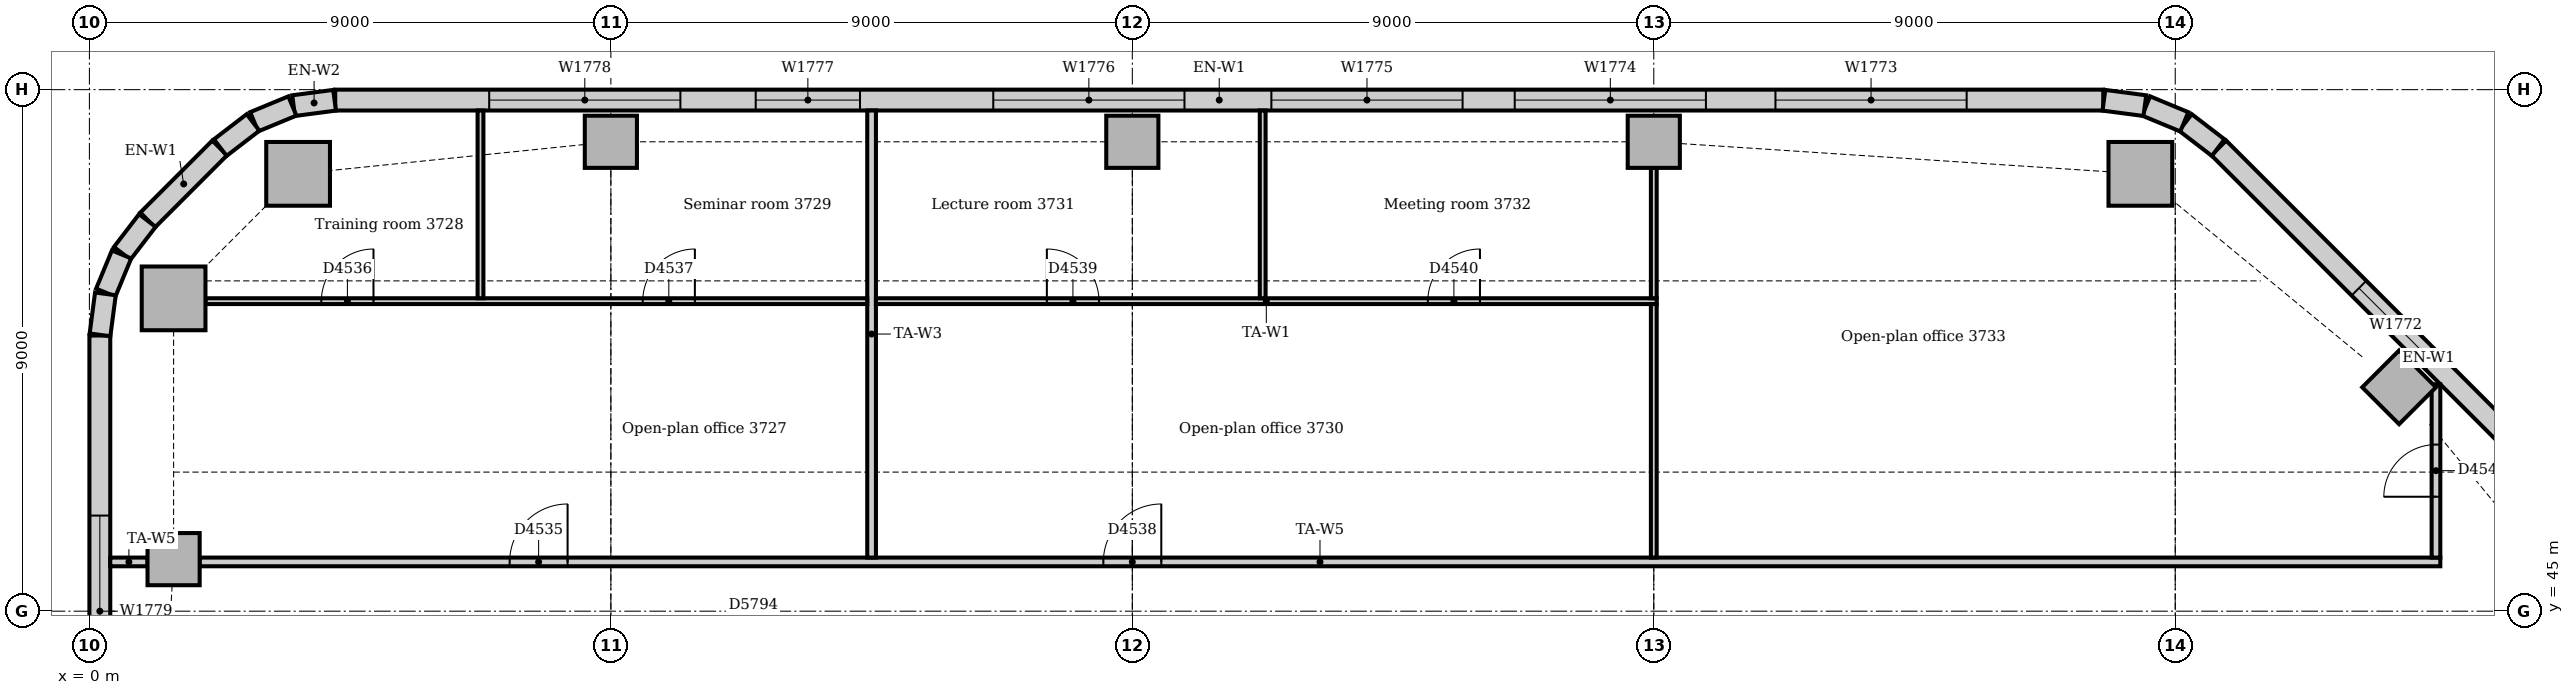
"""IFC4 building model, lengths in metres.
Left out: names, types, materials, properties, quantities, classifications, styles, units other than length and angle.
Written with IfcOpenShell. Run it as: python <this file> out.ifc"""

import sys

from ifc_helpers import new_model, si_unit, direction, frame, frame_2d, origin, origin_2d, place, context, subcontext, project, spatial, rectangle, extrude, element, fill, save


model = new_model("IFC4")
c1 = context("Model", 3, precision=1e-05, world=origin(), true_north=direction((0.0, 1.0)))
c2 = subcontext(c1, "Body", "Model", "MODEL_VIEW")
j1 = project(units=[si_unit("LENGTHUNIT", "METRE"), si_unit("PLANEANGLEUNIT", "RADIAN")], contexts=[c1])
p1 = place(None, origin())
s1 = spatial("IfcSite", under=j1, at=p1, CompositionType="ELEMENT")
p2 = place(p1, origin())
s2 = spatial("IfcBuilding", under=s1, at=p2, CompositionType="ELEMENT")
p3 = place(p2, frame((0.0, 0.0, 157.0)))
s3 = spatial("IfcBuildingStorey", under=s2, at=p3, CompositionType="ELEMENT", Elevation=157.0)
for number, where, z_axis, x_axis in (
    (1, (35.398, 52.547, 0.0), (0.0, 0.0, 1.0), (1.0, 0.0, 0.0)),
    (2, (3.602, 52.547, 0.0), (0.0, 0.0, 1.0), (1.0, 0.0, 0.0)),
    (3, (1.453, 50.398, 0.0), (0.0, 0.0, 1.0), (1.0, 0.0, 0.0)),
):
    element("IfcColumn", number, at=place(p3, frame(where, z_axis=z_axis, x_axis=x_axis)), inside=s3, PredefinedType="COLUMN", context=c2, shape_type="SweptSolid", body=[
        extrude(rectangle(XDim=1.1, YDim=1.1, at=origin_2d()), origin(), (0.0, 0.0, 1.0), 3.85),
    ])
for number, where, z_axis, x_axis in (
    (4, (39.864, 48.864, 0.0), (0.0, 0.0, 1.0), (0.707, 0.707, 0.0)),
    (5, (9.0, 53.1, 0.0), (0.0, 0.0, 1.0), (1.0, 0.0, 0.0)),
    (6, (18.0, 53.1, 0.0), (0.0, 0.0, 1.0), (1.0, 0.0, 0.0)),
    (7, (27.0, 53.1, 0.0), (0.0, 0.0, 1.0), (1.0, 0.0, 0.0)),
    (8, (1.453, 45.898, 0.0), (0.0, 0.0, 1.0), (1.0, 0.0, 0.0)),
):
    element("IfcColumn", number, at=place(p3, frame(where, z_axis=z_axis, x_axis=x_axis)), inside=s3, PredefinedType="COLUMN", context=c2, shape_type="SweptSolid", body=[
        extrude(rectangle(XDim=0.9, YDim=0.9, at=origin_2d()), origin(), (0.0, 0.0, 1.0), 3.85),
    ])
p4 = place(p3, frame((43.994, 45.751, 0.0), z_axis=(0.0, 0.0, 1.0), x_axis=(-0.707106781187, 0.707106781187, 0.0)))
e9 = element("IfcWall", 9, at=p4, inside=s3, PredefinedType="STANDARD", context=c2, shape_type="SweptSolid", body=[
    extrude(rectangle(XDim=10.243, YDim=0.36, at=frame_2d((5.121, 0.0))), origin(), (0.0, 0.0, 1.0), 3.85),
])
p5 = place(p4, frame((5.021, 0.0, 0.9)))
e10 = element("IfcOpeningElement", 10, at=p5, cuts=e9, PredefinedType="OPENING", context=c2, shape_type="SweptSolid", body=[
    extrude(rectangle(XDim=1.8, YDim=1.6, at=frame_2d((0.9, 0.8))), frame((0.0, 0.19, 0.0), z_axis=(0.0, -1.0, 0.0), x_axis=(1.0, 0.0, 0.0)), (0.0, 0.0, 1.0), 0.38),
])
p6 = place(p3, frame((34.757, 53.82, 0.0), z_axis=(0.0, 0.0, 1.0), x_axis=(-1.0, 0.0, 0.0)))
e11 = element("IfcWall", 11, at=p6, inside=s3, PredefinedType="STANDARD", context=c2, shape_type="SweptSolid", body=[
    extrude(rectangle(XDim=30.515, YDim=0.36, at=frame_2d((15.257, 0.0))), origin(), (0.0, 0.0, 1.0), 3.85),
])
p7 = place(p6, frame((2.357, 0.0, 0.9)))
e12 = element("IfcOpeningElement", 12, at=p7, cuts=e11, PredefinedType="OPENING", context=c2, shape_type="SweptSolid", body=[
    extrude(rectangle(XDim=3.3, YDim=1.6, at=frame_2d((1.65, 0.8))), frame((0.0, 0.19, 0.0), z_axis=(0.0, -1.0, 0.0), x_axis=(1.0, 0.0, 0.0)), (0.0, 0.0, 1.0), 0.38),
])
p8 = place(p6, frame((6.857, 0.0, 0.9)))
e13 = element("IfcOpeningElement", 13, at=p8, cuts=e11, PredefinedType="OPENING", context=c2, shape_type="SweptSolid", body=[
    extrude(rectangle(XDim=3.3, YDim=1.6, at=frame_2d((1.65, 0.8))), frame((0.0, 0.19, 0.0), z_axis=(0.0, -1.0, 0.0), x_axis=(1.0, 0.0, 0.0)), (0.0, 0.0, 1.0), 0.38),
])
p9 = place(p6, frame((11.057, 0.0, 0.9)))
e14 = element("IfcOpeningElement", 14, at=p9, cuts=e11, PredefinedType="OPENING", context=c2, shape_type="SweptSolid", body=[
    extrude(rectangle(XDim=3.3, YDim=1.6, at=frame_2d((1.65, 0.8))), frame((0.0, 0.19, 0.0), z_axis=(0.0, -1.0, 0.0), x_axis=(1.0, 0.0, 0.0)), (0.0, 0.0, 1.0), 0.38),
])
p10 = place(p6, frame((15.857, 0.0, 0.9)))
e15 = element("IfcOpeningElement", 15, at=p10, cuts=e11, PredefinedType="OPENING", context=c2, shape_type="SweptSolid", body=[
    extrude(rectangle(XDim=3.3, YDim=1.6, at=frame_2d((1.65, 0.8))), frame((0.0, 0.19, 0.0), z_axis=(0.0, -1.0, 0.0), x_axis=(1.0, 0.0, 0.0)), (0.0, 0.0, 1.0), 0.38),
])
p11 = place(p6, frame((21.457, 0.0, 0.9)))
e16 = element("IfcOpeningElement", 16, at=p11, cuts=e11, PredefinedType="OPENING", context=c2, shape_type="SweptSolid", body=[
    extrude(rectangle(XDim=1.8, YDim=1.6, at=frame_2d((0.9, 0.8))), frame((0.0, 0.19, 0.0), z_axis=(0.0, -1.0, 0.0), x_axis=(1.0, 0.0, 0.0)), (0.0, 0.0, 1.0), 0.38),
])
p12 = place(p6, frame((24.557, 0.0, 0.9)))
e17 = element("IfcOpeningElement", 17, at=p12, cuts=e11, PredefinedType="OPENING", context=c2, shape_type="SweptSolid", body=[
    extrude(rectangle(XDim=3.3, YDim=1.6, at=frame_2d((1.65, 0.8))), frame((0.0, 0.19, 0.0), z_axis=(0.0, -1.0, 0.0), x_axis=(1.0, 0.0, 0.0)), (0.0, 0.0, 1.0), 0.38),
])
p13 = place(p3, frame((2.249, 52.994, 0.0), z_axis=(0.0, 0.0, 1.0), x_axis=(-0.707106781187, -0.707106781187, 0.0)))
e18 = element("IfcWall", 18, at=p13, inside=s3, PredefinedType="STANDARD", context=c2, shape_type="SweptSolid", body=[
    extrude(rectangle(XDim=1.757, YDim=0.36, at=frame_2d((0.879, 0.0))), origin(), (0.0, 0.0, 1.0), 3.85),
])
p14 = place(p3, frame((0.18, 49.757, 0.0), z_axis=(0.0, 0.0, 1.0), x_axis=(0.0, -1.0, 0.0)))
e19 = element("IfcWall", 19, at=p14, inside=s3, PredefinedType="STANDARD", context=c2, shape_type="SweptSolid", body=[
    extrude(rectangle(XDim=7.757, YDim=0.36, at=frame_2d((3.879, 0.0))), origin(), (0.0, 0.0, 1.0), 3.85),
])
p15 = place(p14, frame((3.107, 0.0, 0.9)))
e20 = element("IfcOpeningElement", 20, at=p15, cuts=e19, PredefinedType="OPENING", context=c2, shape_type="SweptSolid", body=[
    extrude(rectangle(XDim=3.3, YDim=1.6, at=frame_2d((1.65, 0.8))), frame((0.0, 0.19, 0.0), z_axis=(0.0, -1.0, 0.0), x_axis=(1.0, 0.0, 0.0)), (0.0, 0.0, 1.0), 0.38),
])
p16 = place(p3, frame((36.741, 53.0, 0.0), z_axis=(0.0, 0.0, 1.0), x_axis=(-0.793321924995, 0.608802368033, 0.0)))
e21 = element("IfcWall", 21, at=p16, inside=s3, PredefinedType="STANDARD", context=c2, shape_type="SweptSolid", body=[
    extrude(rectangle(XDim=0.713, YDim=0.36, at=frame_2d((0.357, 0.0))), origin(), (0.0, 0.0, 1.0), 3.85),
])
for number, where, z_axis, x_axis in (
    (22, (36.156, 53.445, 0.0), (0.0, 0.0, 1.0), (-0.924, 0.383, 0.0)),
    (23, (35.476, 53.724, 0.0), (0.0, 0.0, 1.0), (-0.991, 0.131, 0.0)),
    (24, (4.231, 53.817, 0.0), (0.0, 0.0, 1.0), (-0.991, -0.131, 0.0)),
    (25, (3.503, 53.718, 0.0), (0.0, 0.0, 1.0), (-0.924, -0.383, 0.0)),
):
    element("IfcWall", number, at=place(p3, frame(where, z_axis=z_axis, x_axis=x_axis)), inside=s3, PredefinedType="STANDARD", context=c2, shape_type="SweptSolid", body=[
        extrude(rectangle(XDim=0.713, YDim=0.36, at=frame_2d((0.356, 0.0))), origin(), (0.0, 0.0, 1.0), 3.85),
    ])
for number, where, z_axis, x_axis in (
    (26, (2.825, 53.434, 0.0), (0.0, 0.0, 1.0), (-0.793, -0.609, 0.0)),
    (27, (1.0, 51.741, 0.0), (0.0, 0.0, 1.0), (-0.609, -0.793, 0.0)),
):
    element("IfcWall", number, at=place(p3, frame(where, z_axis=z_axis, x_axis=x_axis)), inside=s3, PredefinedType="STANDARD", context=c2, shape_type="SweptSolid", body=[
        extrude(rectangle(XDim=0.713, YDim=0.36, at=frame_2d((0.357, 0.0))), origin(), (0.0, 0.0, 1.0), 3.85),
    ])
for number, where, z_axis, x_axis in (
    (28, (0.555, 51.156, 0.0), (0.0, 0.0, 1.0), (-0.383, -0.924, 0.0)),
    (29, (0.276, 50.476, 0.0), (0.0, 0.0, 1.0), (-0.131, -0.991, 0.0)),
):
    element("IfcWall", number, at=place(p3, frame(where, z_axis=z_axis, x_axis=x_axis)), inside=s3, PredefinedType="STANDARD", context=c2, shape_type="SweptSolid", body=[
        extrude(rectangle(XDim=0.713, YDim=0.36, at=frame_2d((0.356, 0.0))), origin(), (0.0, 0.0, 1.0), 3.85),
    ])
p17 = place(p3, frame((1.903, 45.85, 0.0), z_axis=(0.0, 0.0, 1.0), x_axis=(1.0, 0.0, 0.0)))
e30 = element("IfcWall", 30, at=p17, inside=s3, PredefinedType="PARTITIONING", context=c2, shape_type="SweptSolid", body=[
    extrude(rectangle(XDim=38.672, YDim=0.15, at=frame_2d((19.336, 0.0))), origin(), (0.0, 0.0, 1.0), 3.85),
])
p18 = place(p17, frame((5.35, 0.0, 0.0)))
e31 = element("IfcOpeningElement", 31, at=p18, cuts=e30, PredefinedType="OPENING", context=c2, shape_type="SweptSolid", body=[
    extrude(rectangle(XDim=1.0, YDim=2.1, at=frame_2d((0.5, 1.05))), frame((0.0, 0.085, 0.0), z_axis=(0.0, -1.0, 0.0), x_axis=(1.0, 0.0, 0.0)), (0.0, 0.0, 1.0), 0.17),
])
p19 = place(p17, frame((15.597, 0.0, 0.0)))
e32 = element("IfcOpeningElement", 32, at=p19, cuts=e30, PredefinedType="OPENING", context=c2, shape_type="SweptSolid", body=[
    extrude(rectangle(XDim=1.0, YDim=2.1, at=frame_2d((0.5, 1.05))), frame((0.0, 0.085, 0.0), z_axis=(0.0, -1.0, 0.0), x_axis=(1.0, 0.0, 0.0)), (0.0, 0.0, 1.0), 0.17),
])
p20 = place(p3, frame((0.36, 45.85, 0.0), z_axis=(0.0, 0.0, 1.0), x_axis=(1.0, 0.0, 0.0)))
e33 = element("IfcWall", 33, at=p20, inside=s3, PredefinedType="PARTITIONING", context=c2, shape_type="SweptSolid", body=[
    extrude(rectangle(XDim=0.643, YDim=0.15, at=frame_2d((0.322, 0.0))), origin(), (0.0, 0.0, 1.0), 3.85),
])
p21 = place(p3, frame((40.5, 45.925, 0.0), z_axis=(0.0, 0.0, 1.0), x_axis=(0.0, 1.0, 0.0)))
e34 = element("IfcWall", 34, at=p21, inside=s3, PredefinedType="PARTITIONING", context=c2, shape_type="SweptSolid", body=[
    extrude(rectangle(XDim=2.991, YDim=0.15, at=frame_2d((1.496, 0.0))), origin(), (0.0, 0.0, 1.0), 3.85),
])
p22 = place(p21, frame((1.05, 0.0, 0.0)))
e35 = element("IfcOpeningElement", 35, at=p22, cuts=e34, PredefinedType="OPENING", context=c2, shape_type="SweptSolid", body=[
    extrude(rectangle(XDim=0.9, YDim=2.1, at=frame_2d((0.45, 1.05))), frame((0.0, 0.085, 0.0), z_axis=(0.0, -1.0, 0.0), x_axis=(1.0, 0.0, 0.0)), (0.0, 0.0, 1.0), 0.17),
])
p23 = place(p3, frame((13.5, 45.925, 0.0), z_axis=(0.0, 0.0, 1.0), x_axis=(0.0, 1.0, 0.0)))
e36 = element("IfcWall", 36, at=p23, inside=s3, PredefinedType="PARTITIONING", context=c2, shape_type="SweptSolid", body=[
    extrude(rectangle(XDim=7.715, YDim=0.15, at=frame_2d((3.857, 0.0))), origin(), (0.0, 0.0, 1.0), 3.85),
])
p24 = place(p3, frame((13.575, 50.35, 0.0), z_axis=(0.0, 0.0, 1.0), x_axis=(1.0, 0.0, 0.0)))
e37 = element("IfcWall", 37, at=p24, inside=s3, PredefinedType="PARTITIONING", context=c2, shape_type="SweptSolid", body=[
    extrude(rectangle(XDim=13.475, YDim=0.1, at=frame_2d((6.737, 0.0))), origin(), (0.0, 0.0, 1.0), 3.85),
])
p25 = place(p24, frame((2.95, 0.0, 0.0)))
e38 = element("IfcOpeningElement", 38, at=p25, cuts=e37, PredefinedType="OPENING", context=c2, shape_type="SweptSolid", body=[
    extrude(rectangle(XDim=0.9, YDim=2.1, at=frame_2d((0.45, 1.05))), frame((0.0, 0.06, 0.0), z_axis=(0.0, -1.0, 0.0), x_axis=(1.0, 0.0, 0.0)), (0.0, 0.0, 1.0), 0.12),
])
p26 = place(p24, frame((9.525, 0.0, 0.0)))
e39 = element("IfcOpeningElement", 39, at=p26, cuts=e37, PredefinedType="OPENING", context=c2, shape_type="SweptSolid", body=[
    extrude(rectangle(XDim=0.9, YDim=2.1, at=frame_2d((0.45, 1.05))), frame((0.0, 0.06, 0.0), z_axis=(0.0, -1.0, 0.0), x_axis=(1.0, 0.0, 0.0)), (0.0, 0.0, 1.0), 0.12),
])
p27 = place(p3, frame((2.003, 50.35, 0.0), z_axis=(0.0, 0.0, 1.0), x_axis=(1.0, 0.0, 0.0)))
e40 = element("IfcWall", 40, at=p27, inside=s3, PredefinedType="PARTITIONING", context=c2, shape_type="SweptSolid", body=[
    extrude(rectangle(XDim=11.422, YDim=0.1, at=frame_2d((5.711, 0.0))), origin(), (0.0, 0.0, 1.0), 3.85),
])
p28 = place(p27, frame((2.0, 0.0, 0.0)))
e41 = element("IfcOpeningElement", 41, at=p28, cuts=e40, PredefinedType="OPENING", context=c2, shape_type="SweptSolid", body=[
    extrude(rectangle(XDim=0.9, YDim=2.1, at=frame_2d((0.45, 1.05))), frame((0.0, 0.06, 0.0), z_axis=(0.0, -1.0, 0.0), x_axis=(1.0, 0.0, 0.0)), (0.0, 0.0, 1.0), 0.12),
])
p29 = place(p27, frame((7.547, 0.0, 0.0)))
e42 = element("IfcOpeningElement", 42, at=p29, cuts=e40, PredefinedType="OPENING", context=c2, shape_type="SweptSolid", body=[
    extrude(rectangle(XDim=0.9, YDim=2.1, at=frame_2d((0.45, 1.05))), frame((0.0, 0.06, 0.0), z_axis=(0.0, -1.0, 0.0), x_axis=(1.0, 0.0, 0.0)), (0.0, 0.0, 1.0), 0.12),
])
p30 = place(p3, frame((27.0, 45.925, 0.0), z_axis=(0.0, 0.0, 1.0), x_axis=(0.0, 1.0, 0.0)))
e43 = element("IfcWall", 43, at=p30, inside=s3, PredefinedType="PARTITIONING", context=c2, shape_type="SweptSolid", body=[
    extrude(rectangle(XDim=4.375, YDim=0.1, at=frame_2d((2.188, 0.0))), origin(), (0.0, 0.0, 1.0), 3.362),
])
p31 = place(p3, frame((27.0, 50.4, 0.0), z_axis=(0.0, 0.0, 1.0), x_axis=(0.0, 1.0, 0.0)))
e44 = element("IfcWall", 44, at=p31, inside=s3, PredefinedType="PARTITIONING", context=c2, shape_type="SweptSolid", body=[
    extrude(rectangle(XDim=2.25, YDim=0.1, at=frame_2d((1.125, 0.0))), origin(), (0.0, 0.0, 1.0), 3.362),
])
for number, where, z_axis, x_axis in (
    (45, (6.75, 50.4, 0.0), (0.0, 0.0, 1.0), (0.0, 1.0, 0.0)),
    (46, (20.25, 50.4, 0.0), (0.0, 0.0, 1.0), (0.0, 1.0, 0.0)),
):
    element("IfcWall", number, at=place(p3, frame(where, z_axis=z_axis, x_axis=x_axis)), inside=s3, PredefinedType="PARTITIONING", context=c2, shape_type="SweptSolid", body=[
        extrude(rectangle(XDim=3.24, YDim=0.1, at=frame_2d((1.62, 0.0))), origin(), (0.0, 0.0, 1.0), 3.85),
    ])
p32 = place(p5, origin())
e47 = element("IfcWindow", 47, at=p32, inside=s3, PartitioningType="SINGLE_PANEL", PredefinedType="WINDOW", context=c2, shape_type="SweptSolid", body=[
    extrude(rectangle(XDim=1.8, YDim=1.6, at=frame_2d((0.9, 0.8))), frame((0.0, 0.13, 0.0), z_axis=(0.0, -1.0, 0.0), x_axis=(1.0, 0.0, 0.0)), (0.0, 0.0, 1.0), 0.06),
])
fill(e10, e47)
p33 = place(p7, origin())
e48 = element("IfcWindow", 48, at=p33, inside=s3, PartitioningType="SINGLE_PANEL", PredefinedType="WINDOW", context=c2, shape_type="SweptSolid", body=[
    extrude(rectangle(XDim=3.3, YDim=1.6, at=frame_2d((1.65, 0.8))), frame((0.0, 0.13, 0.0), z_axis=(0.0, -1.0, 0.0), x_axis=(1.0, 0.0, 0.0)), (0.0, 0.0, 1.0), 0.06),
])
fill(e12, e48)
p34 = place(p8, origin())
e49 = element("IfcWindow", 49, at=p34, inside=s3, PartitioningType="SINGLE_PANEL", PredefinedType="WINDOW", context=c2, shape_type="SweptSolid", body=[
    extrude(rectangle(XDim=3.3, YDim=1.6, at=frame_2d((1.65, 0.8))), frame((0.0, 0.13, 0.0), z_axis=(0.0, -1.0, 0.0), x_axis=(1.0, 0.0, 0.0)), (0.0, 0.0, 1.0), 0.06),
])
fill(e13, e49)
p35 = place(p9, origin())
e50 = element("IfcWindow", 50, at=p35, inside=s3, PartitioningType="SINGLE_PANEL", PredefinedType="WINDOW", context=c2, shape_type="SweptSolid", body=[
    extrude(rectangle(XDim=3.3, YDim=1.6, at=frame_2d((1.65, 0.8))), frame((0.0, 0.13, 0.0), z_axis=(0.0, -1.0, 0.0), x_axis=(1.0, 0.0, 0.0)), (0.0, 0.0, 1.0), 0.06),
])
fill(e14, e50)
p36 = place(p10, origin())
e51 = element("IfcWindow", 51, at=p36, inside=s3, PartitioningType="SINGLE_PANEL", PredefinedType="WINDOW", context=c2, shape_type="SweptSolid", body=[
    extrude(rectangle(XDim=3.3, YDim=1.6, at=frame_2d((1.65, 0.8))), frame((0.0, 0.13, 0.0), z_axis=(0.0, -1.0, 0.0), x_axis=(1.0, 0.0, 0.0)), (0.0, 0.0, 1.0), 0.06),
])
fill(e15, e51)
p37 = place(p11, origin())
e52 = element("IfcWindow", 52, at=p37, inside=s3, PartitioningType="SINGLE_PANEL", PredefinedType="WINDOW", context=c2, shape_type="SweptSolid", body=[
    extrude(rectangle(XDim=1.8, YDim=1.6, at=frame_2d((0.9, 0.8))), frame((0.0, 0.13, 0.0), z_axis=(0.0, -1.0, 0.0), x_axis=(1.0, 0.0, 0.0)), (0.0, 0.0, 1.0), 0.06),
])
fill(e16, e52)
p38 = place(p12, origin())
e53 = element("IfcWindow", 53, at=p38, inside=s3, PartitioningType="SINGLE_PANEL", PredefinedType="WINDOW", context=c2, shape_type="SweptSolid", body=[
    extrude(rectangle(XDim=3.3, YDim=1.6, at=frame_2d((1.65, 0.8))), frame((0.0, 0.13, 0.0), z_axis=(0.0, -1.0, 0.0), x_axis=(1.0, 0.0, 0.0)), (0.0, 0.0, 1.0), 0.06),
])
fill(e17, e53)
p39 = place(p15, origin())
e54 = element("IfcWindow", 54, at=p39, inside=s3, PartitioningType="SINGLE_PANEL", PredefinedType="WINDOW", context=c2, shape_type="SweptSolid", body=[
    extrude(rectangle(XDim=3.3, YDim=1.6, at=frame_2d((1.65, 0.8))), frame((0.0, 0.13, 0.0), z_axis=(0.0, -1.0, 0.0), x_axis=(1.0, 0.0, 0.0)), (0.0, 0.0, 1.0), 0.06),
])
fill(e20, e54)
p40 = place(p18, origin())
e55 = element("IfcDoor", 55, at=p40, inside=s3, OperationType="SINGLE_SWING_RIGHT", PredefinedType="DOOR", context=c2, shape_type="SweptSolid", body=[
    extrude(rectangle(XDim=1.0, YDim=2.1, at=frame_2d((0.5, 1.05))), frame((0.0, 0.025, 0.0), z_axis=(0.0, -1.0, 0.0), x_axis=(1.0, 0.0, 0.0)), (0.0, 0.0, 1.0), 0.05),
])
fill(e31, e55)
p41 = place(p28, origin())
e56 = element("IfcDoor", 56, at=p41, inside=s3, OperationType="SINGLE_SWING_RIGHT", PredefinedType="DOOR", context=c2, shape_type="SweptSolid", body=[
    extrude(rectangle(XDim=0.9, YDim=2.1, at=frame_2d((0.45, 1.05))), frame((0.0, 0.025, 0.0), z_axis=(0.0, -1.0, 0.0), x_axis=(1.0, 0.0, 0.0)), (0.0, 0.0, 1.0), 0.05),
])
fill(e41, e56)
p42 = place(p29, origin())
e57 = element("IfcDoor", 57, at=p42, inside=s3, OperationType="SINGLE_SWING_RIGHT", PredefinedType="DOOR", context=c2, shape_type="SweptSolid", body=[
    extrude(rectangle(XDim=0.9, YDim=2.1, at=frame_2d((0.45, 1.05))), frame((0.0, 0.025, 0.0), z_axis=(0.0, -1.0, 0.0), x_axis=(1.0, 0.0, 0.0)), (0.0, 0.0, 1.0), 0.05),
])
fill(e42, e57)
p43 = place(p19, origin())
e58 = element("IfcDoor", 58, at=p43, inside=s3, OperationType="SINGLE_SWING_RIGHT", PredefinedType="DOOR", context=c2, shape_type="SweptSolid", body=[
    extrude(rectangle(XDim=1.0, YDim=2.1, at=frame_2d((0.5, 1.05))), frame((0.0, 0.025, 0.0), z_axis=(0.0, -1.0, 0.0), x_axis=(1.0, 0.0, 0.0)), (0.0, 0.0, 1.0), 0.05),
])
fill(e32, e58)
p44 = place(p25, origin())
e59 = element("IfcDoor", 59, at=p44, inside=s3, OperationType="SINGLE_SWING_LEFT", PredefinedType="DOOR", context=c2, shape_type="SweptSolid", body=[
    extrude(rectangle(XDim=0.9, YDim=2.1, at=frame_2d((0.45, 1.05))), frame((0.0, 0.025, 0.0), z_axis=(0.0, -1.0, 0.0), x_axis=(1.0, 0.0, 0.0)), (0.0, 0.0, 1.0), 0.05),
])
fill(e38, e59)
p45 = place(p26, origin())
e60 = element("IfcDoor", 60, at=p45, inside=s3, OperationType="SINGLE_SWING_RIGHT", PredefinedType="DOOR", context=c2, shape_type="SweptSolid", body=[
    extrude(rectangle(XDim=0.9, YDim=2.1, at=frame_2d((0.45, 1.05))), frame((0.0, 0.025, 0.0), z_axis=(0.0, -1.0, 0.0), x_axis=(1.0, 0.0, 0.0)), (0.0, 0.0, 1.0), 0.05),
])
fill(e39, e60)
p46 = place(p22, origin())
e61 = element("IfcDoor", 61, at=p46, inside=s3, OperationType="SINGLE_SWING_LEFT", PredefinedType="DOOR", context=c2, shape_type="SweptSolid", body=[
    extrude(rectangle(XDim=0.9, YDim=2.1, at=frame_2d((0.45, 1.05))), frame((0.0, 0.025, 0.0), z_axis=(0.0, -1.0, 0.0), x_axis=(1.0, 0.0, 0.0)), (0.0, 0.0, 1.0), 0.05),
])
fill(e35, e61)
save(model, sys.argv[1])
